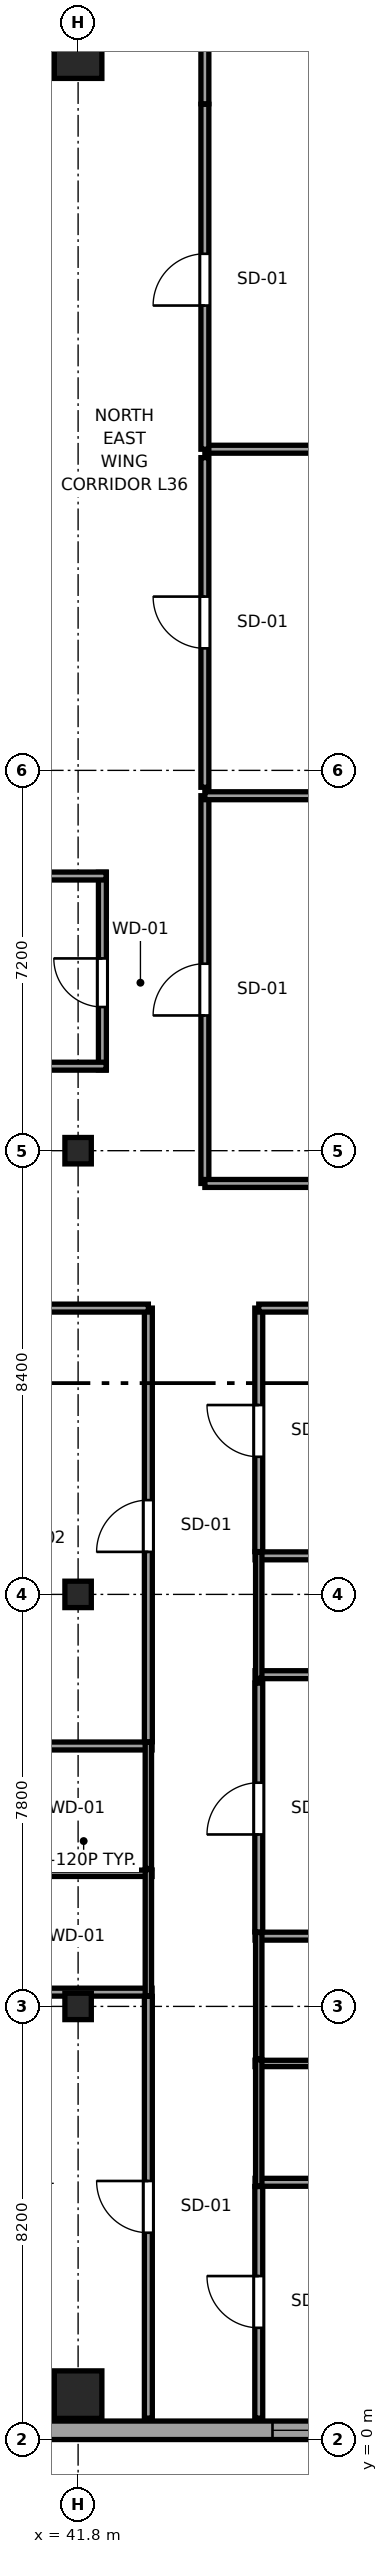
"""IFC4 building model, lengths in metres.
Left out: names, types, materials, properties, quantities, classifications, styles, units other than length and angle.
Written with IfcOpenShell. Run it as: python <this file> out.ifc"""

import sys

from ifc_helpers import new_model, si_unit, direction, frame, frame_2d, origin, origin_2d, place, context, subcontext, project, spatial, rectangle, i_section, extrude, source, transform, mapped, element, fill, save


model = new_model("IFC4")
c1 = context("Model", 3, precision=1e-05, world=origin(), true_north=direction((0.0, 1.0)))
c2 = subcontext(c1, "Body", "Model", "MODEL_VIEW")
j1 = project(units=[si_unit("LENGTHUNIT", "METRE"), si_unit("PLANEANGLEUNIT", "RADIAN")], contexts=[c1])
p1 = place(None, origin())
s1 = spatial("IfcSite", under=j1, at=p1, CompositionType="ELEMENT")
p2 = place(p1, origin())
s2 = spatial("IfcBuilding", under=s1, at=p2, CompositionType="ELEMENT")
p3 = place(p2, frame((0.0, 0.0, 139.95)))
s3 = spatial("IfcBuildingStorey", under=s2, at=p3, CompositionType="ELEMENT", Elevation=139.95)
m1 = source(origin(), c2, "Body", "SweptSolid", [
    extrude(rectangle(XDim=0.9, YDim=0.9, at=origin_2d()), origin(), (0.0, 0.0, 1.0), 3.55),
])
p4 = place(p3, frame((41.8, 0.85, 0.0), z_axis=(0.0, 0.0, 1.0), x_axis=(1.0, 0.0, 0.0)))
e1 = element("IfcColumn", 1, at=p4, inside=s3, PredefinedType="COLUMN", context=c2, shape_type="MappedRepresentation", body=[
    mapped(m1, transform((0.0, 0.0, 0.0), x_axis=(1.0, 0.0, 0.0), y_axis=(0.0, 1.0, 0.0), z_axis=(0.0, 0.0, 1.0), scale=1.0)),
])
m2 = source(origin(), c2, "Body", "SweptSolid", [
    extrude(i_section(OverallWidth=0.5, OverallDepth=0.5, WebThickness=0.022, FlangeThickness=0.034, at=origin_2d()), origin(), (0.0, 0.0, 1.0), 3.55),
])
for number, where, z_axis, x_axis in (
    (2, (41.8, 8.2, 0.0), (0.0, 0.0, 1.0), (1.0, 0.0, 0.0)),
    (3, (41.8, 16.0, 0.0), (0.0, 0.0, 1.0), (1.0, 0.0, 0.0)),
    (4, (41.8, 24.4, 0.0), (0.0, 0.0, 1.0), (1.0, 0.0, 0.0)),
):
    element("IfcColumn", number, at=place(p3, frame(where, z_axis=z_axis, x_axis=x_axis)), inside=s3, PredefinedType="COLUMN", context=c2, shape_type="MappedRepresentation", body=[
        mapped(m2, transform((0.0, 0.0, 0.0), x_axis=(1.0, 0.0, 0.0), y_axis=(0.0, 1.0, 0.0), z_axis=(0.0, 0.0, 1.0), scale=1.0)),
    ])
p5 = place(p3, frame((41.8, 45.15, 0.0), z_axis=(0.0, 0.0, 1.0), x_axis=(1.0, 0.0, 0.0)))
e5 = element("IfcColumn", 5, at=p5, inside=s3, PredefinedType="COLUMN", context=c2, shape_type="MappedRepresentation", body=[
    mapped(m1, transform((0.0, 0.0, 0.0), x_axis=(1.0, 0.0, 0.0), y_axis=(0.0, 1.0, 0.0), z_axis=(0.0, 0.0, 1.0), scale=1.0)),
])
p6 = place(p3, frame((34.375, 0.175, 0.0), z_axis=(0.0, 0.0, 1.0), x_axis=(1.0, 0.0, 0.0)))
e6 = element("IfcWall", 6, at=p6, inside=s3, PredefinedType="SOLIDWALL", context=c2, shape_type="SweptSolid", body=[
    extrude(rectangle(XDim=18.008, YDim=0.35, at=frame_2d((9.004, 0.0))), origin(), (0.0, 0.0, 1.0), 3.37),
])
p7 = place(p6, frame((1.651, 0.0, 0.68)))
e7 = element("IfcOpeningElement", 7, at=p7, cuts=e6, PredefinedType="OPENING", context=c2, shape_type="SweptSolid", body=[
    extrude(rectangle(XDim=2.1, YDim=1.9, at=frame_2d((1.05, 0.95))), frame((0.0, 0.185, 0.0), z_axis=(0.0, -1.0, 0.0), x_axis=(1.0, 0.0, 0.0)), (0.0, 0.0, 1.0), 0.37),
])
p8 = place(p6, frame((11.105, 0.0, 0.68)))
e8 = element("IfcOpeningElement", 8, at=p8, cuts=e6, PredefinedType="OPENING", context=c2, shape_type="SweptSolid", body=[
    extrude(rectangle(XDim=2.1, YDim=1.9, at=frame_2d((1.05, 0.95))), frame((0.0, 0.185, 0.0), z_axis=(0.0, -1.0, 0.0), x_axis=(1.0, 0.0, 0.0)), (0.0, 0.0, 1.0), 0.37),
])
p9 = place(p3, frame((40.61, 8.47, 0.0), z_axis=(0.0, 0.0, 1.0), x_axis=(1.0, 0.0, 0.0)))
e9 = element("IfcWall", 9, at=p9, inside=s3, PredefinedType="PARTITIONING", context=c2, shape_type="SweptSolid", body=[
    extrude(rectangle(XDim=2.59, YDim=0.15, at=frame_2d((1.295, 0.0))), origin(), (0.0, 0.0, 1.0), 3.37),
])
p10 = place(p3, frame((40.61, 10.72, 0.0), z_axis=(0.0, 0.0, 1.0), x_axis=(1.0, 0.0, 0.0)))
e10 = element("IfcWall", 10, at=p10, inside=s3, PredefinedType="PLUMBINGWALL", context=c2, shape_type="SweptSolid", body=[
    extrude(rectangle(XDim=2.59, YDim=0.12, at=frame_2d((1.295, 0.0))), origin(), (0.0, 0.0, 1.0), 3.37),
])
p11 = place(p3, frame((43.13, 8.4, 0.0), z_axis=(0.0, 0.0, 1.0), x_axis=(0.0, 1.0, 0.0)))
e11 = element("IfcWall", 11, at=p11, inside=s3, PredefinedType="PLUMBINGWALL", context=c2, shape_type="SweptSolid", body=[
    extrude(rectangle(XDim=2.39, YDim=0.12, at=frame_2d((1.195, 0.0))), origin(), (0.0, 0.0, 1.0), 3.37),
])
p12 = place(p3, frame((40.61, 13.13, 0.0), z_axis=(0.0, 0.0, 1.0), x_axis=(1.0, 0.0, 0.0)))
e12 = element("IfcWall", 12, at=p12, inside=s3, PredefinedType="PARTITIONING", context=c2, shape_type="SweptSolid", body=[
    extrude(rectangle(XDim=2.59, YDim=0.15, at=frame_2d((1.295, 0.0))), origin(), (0.0, 0.0, 1.0), 3.37),
])
p13 = place(p3, frame((43.13, 10.81, 0.0), z_axis=(0.0, 0.0, 1.0), x_axis=(0.0, 1.0, 0.0)))
e13 = element("IfcWall", 13, at=p13, inside=s3, PredefinedType="PLUMBINGWALL", context=c2, shape_type="SweptSolid", body=[
    extrude(rectangle(XDim=2.39, YDim=0.12, at=frame_2d((1.195, 0.0))), origin(), (0.0, 0.0, 1.0), 3.37),
])
p14 = place(p3, frame((45.15, 4.87, 0.0), z_axis=(0.0, 0.0, 1.0), x_axis=(1.0, 0.0, 0.0)))
e14 = element("IfcWall", 14, at=p14, inside=s3, PredefinedType="PARTITIONING", context=c2, shape_type="SweptSolid", body=[
    extrude(rectangle(XDim=2.59, YDim=0.15, at=frame_2d((1.295, 0.0))), origin(), (0.0, 0.0, 1.0), 3.37),
])
p15 = place(p3, frame((45.15, 7.12, 0.0), z_axis=(0.0, 0.0, 1.0), x_axis=(1.0, 0.0, 0.0)))
e15 = element("IfcWall", 15, at=p15, inside=s3, PredefinedType="PLUMBINGWALL", context=c2, shape_type="SweptSolid", body=[
    extrude(rectangle(XDim=2.59, YDim=0.12, at=frame_2d((1.295, 0.0))), origin(), (0.0, 0.0, 1.0), 3.37),
])
p16 = place(p3, frame((45.22, 4.8, 0.0), z_axis=(0.0, 0.0, 1.0), x_axis=(0.0, 1.0, 0.0)))
e16 = element("IfcWall", 16, at=p16, inside=s3, PredefinedType="PLUMBINGWALL", context=c2, shape_type="SweptSolid", body=[
    extrude(rectangle(XDim=2.39, YDim=0.12, at=frame_2d((1.195, 0.0))), origin(), (0.0, 0.0, 1.0), 3.37),
])
p17 = place(p3, frame((45.15, 9.53, 0.0), z_axis=(0.0, 0.0, 1.0), x_axis=(1.0, 0.0, 0.0)))
e17 = element("IfcWall", 17, at=p17, inside=s3, PredefinedType="PARTITIONING", context=c2, shape_type="SweptSolid", body=[
    extrude(rectangle(XDim=2.59, YDim=0.15, at=frame_2d((1.295, 0.0))), origin(), (0.0, 0.0, 1.0), 3.37),
])
p18 = place(p3, frame((45.22, 7.21, 0.0), z_axis=(0.0, 0.0, 1.0), x_axis=(0.0, 1.0, 0.0)))
e18 = element("IfcWall", 18, at=p18, inside=s3, PredefinedType="PLUMBINGWALL", context=c2, shape_type="SweptSolid", body=[
    extrude(rectangle(XDim=2.39, YDim=0.12, at=frame_2d((1.195, 0.0))), origin(), (0.0, 0.0, 1.0), 3.37),
])
p19 = place(p3, frame((45.15, 14.48, 0.0), z_axis=(0.0, 0.0, 1.0), x_axis=(1.0, 0.0, 0.0)))
e19 = element("IfcWall", 19, at=p19, inside=s3, PredefinedType="PARTITIONING", context=c2, shape_type="SweptSolid", body=[
    extrude(rectangle(XDim=11.445, YDim=0.15, at=frame_2d((5.723, 0.0))), origin(), (0.0, 0.0, 1.0), 3.37),
])
p20 = place(p3, frame((45.15, 16.73, 0.0), z_axis=(0.0, 0.0, 1.0), x_axis=(1.0, 0.0, 0.0)))
e20 = element("IfcWall", 20, at=p20, inside=s3, PredefinedType="PARTITIONING", context=c2, shape_type="SweptSolid", body=[
    extrude(rectangle(XDim=2.59, YDim=0.15, at=frame_2d((1.295, 0.0))), origin(), (0.0, 0.0, 1.0), 3.37),
])
p21 = place(p3, frame((45.22, 14.41, 0.0), z_axis=(0.0, 0.0, 1.0), x_axis=(0.0, 1.0, 0.0)))
e21 = element("IfcWall", 21, at=p21, inside=s3, PredefinedType="PLUMBINGWALL", context=c2, shape_type="SweptSolid", body=[
    extrude(rectangle(XDim=2.39, YDim=0.12, at=frame_2d((1.195, 0.0))), origin(), (0.0, 0.0, 1.0), 3.37),
])
p22 = place(p3, frame((44.2, 37.68, 0.0), z_axis=(0.0, 0.0, 1.0), x_axis=(1.0, 0.0, 0.0)))
e22 = element("IfcWall", 22, at=p22, inside=s3, PredefinedType="PARTITIONING", context=c2, shape_type="SweptSolid", body=[
    extrude(rectangle(XDim=12.395, YDim=0.15, at=frame_2d((6.198, 0.0))), origin(), (0.0, 0.0, 1.0), 3.37),
])
p23 = place(p3, frame((43.13, 0.405, 0.0), z_axis=(0.0, 0.0, 1.0), x_axis=(0.0, 1.0, 0.0)))
e23 = element("IfcWall", 23, at=p23, inside=s3, PredefinedType="PARTITIONING", context=c2, shape_type="SweptSolid", body=[
    extrude(rectangle(XDim=7.985, YDim=0.15, at=frame_2d((3.992, 0.0))), origin(), (0.0, 0.0, 1.0), 3.37),
])
p24 = place(p23, frame((3.51, 0.0, 0.0)))
e24 = element("IfcOpeningElement", 24, at=p24, cuts=e23, PredefinedType="OPENING", context=c2, shape_type="SweptSolid", body=[
    extrude(rectangle(XDim=0.98, YDim=2.12, at=frame_2d((0.49, 1.06))), frame((0.0, 0.085, 0.0), z_axis=(0.0, -1.0, 0.0), x_axis=(1.0, 0.0, 0.0)), (0.0, 0.0, 1.0), 0.17),
])
p25 = place(p3, frame((43.13, 13.21, 0.0), z_axis=(0.0, 0.0, 1.0), x_axis=(0.0, 1.0, 0.0)))
e25 = element("IfcWall", 25, at=p25, inside=s3, PredefinedType="PARTITIONING", context=c2, shape_type="SweptSolid", body=[
    extrude(rectangle(XDim=8.21, YDim=0.15, at=frame_2d((4.105, 0.0))), origin(), (0.0, 0.0, 1.0), 3.37),
])
p26 = place(p25, frame((3.595, 0.0, 0.0)))
e26 = element("IfcOpeningElement", 26, at=p26, cuts=e25, PredefinedType="OPENING", context=c2, shape_type="SweptSolid", body=[
    extrude(rectangle(XDim=0.98, YDim=2.12, at=frame_2d((0.49, 1.06))), frame((0.0, 0.085, 0.0), z_axis=(0.0, -1.0, 0.0), x_axis=(1.0, 0.0, 0.0)), (0.0, 0.0, 1.0), 0.17),
])
p27 = place(p3, frame((34.65, 21.42, 0.0), z_axis=(0.0, 0.0, 1.0), x_axis=(1.0, 0.0, 0.0)))
e27 = element("IfcWall", 27, at=p27, inside=s3, PredefinedType="PARTITIONING", context=c2, shape_type="SweptSolid", body=[
    extrude(rectangle(XDim=8.48, YDim=0.15, at=frame_2d((4.24, 0.0))), origin(), (0.0, 0.0, 1.0), 3.37),
])
p28 = place(p3, frame((45.22, 0.405, 0.0), z_axis=(0.0, 0.0, 1.0), x_axis=(0.0, 1.0, 0.0)))
e28 = element("IfcWall", 28, at=p28, inside=s3, PredefinedType="PARTITIONING", context=c2, shape_type="SweptSolid", body=[
    extrude(rectangle(XDim=4.385, YDim=0.15, at=frame_2d((2.192, 0.0))), origin(), (0.0, 0.0, 1.0), 3.37),
])
p29 = place(p28, frame((1.71, 0.0, 0.0)))
e29 = element("IfcOpeningElement", 29, at=p29, cuts=e28, PredefinedType="OPENING", context=c2, shape_type="SweptSolid", body=[
    extrude(rectangle(XDim=0.98, YDim=2.12, at=frame_2d((0.49, 1.06))), frame((0.0, 0.085, 0.0), z_axis=(0.0, -1.0, 0.0), x_axis=(1.0, 0.0, 0.0)), (0.0, 0.0, 1.0), 0.17),
])
p30 = place(p3, frame((45.22, 9.61, 0.0), z_axis=(0.0, 0.0, 1.0), x_axis=(0.0, 1.0, 0.0)))
e30 = element("IfcWall", 30, at=p30, inside=s3, PredefinedType="PARTITIONING", context=c2, shape_type="SweptSolid", body=[
    extrude(rectangle(XDim=4.71, YDim=0.15, at=frame_2d((2.355, 0.0))), origin(), (0.0, 0.0, 1.0), 3.37),
])
p31 = place(p30, frame((1.845, 0.0, 0.0)))
e31 = element("IfcOpeningElement", 31, at=p31, cuts=e30, PredefinedType="OPENING", context=c2, shape_type="SweptSolid", body=[
    extrude(rectangle(XDim=0.98, YDim=2.12, at=frame_2d((0.49, 1.06))), frame((0.0, 0.085, 0.0), z_axis=(0.0, -1.0, 0.0), x_axis=(1.0, 0.0, 0.0)), (0.0, 0.0, 1.0), 0.17),
])
p32 = place(p3, frame((45.22, 16.81, 0.0), z_axis=(0.0, 0.0, 1.0), x_axis=(0.0, 1.0, 0.0)))
e32 = element("IfcWall", 32, at=p32, inside=s3, PredefinedType="PARTITIONING", context=c2, shape_type="SweptSolid", body=[
    extrude(rectangle(XDim=4.61, YDim=0.15, at=frame_2d((2.305, 0.0))), origin(), (0.0, 0.0, 1.0), 3.37),
])
p33 = place(p32, frame((1.795, 0.0, 0.0)))
e33 = element("IfcOpeningElement", 33, at=p33, cuts=e32, PredefinedType="OPENING", context=c2, shape_type="SweptSolid", body=[
    extrude(rectangle(XDim=0.98, YDim=2.12, at=frame_2d((0.49, 1.06))), frame((0.0, 0.085, 0.0), z_axis=(0.0, -1.0, 0.0), x_axis=(1.0, 0.0, 0.0)), (0.0, 0.0, 1.0), 0.17),
])
p34 = place(p3, frame((45.22, 21.42, 0.0), z_axis=(0.0, 0.0, 1.0), x_axis=(1.0, 0.0, 0.0)))
e34 = element("IfcWall", 34, at=p34, inside=s3, PredefinedType="PARTITIONING", context=c2, shape_type="SweptSolid", body=[
    extrude(rectangle(XDim=11.375, YDim=0.15, at=frame_2d((5.688, 0.0))), origin(), (0.0, 0.0, 1.0), 3.37),
])
p35 = place(p3, frame((44.2, 23.78, 0.0), z_axis=(0.0, 0.0, 1.0), x_axis=(0.0, 1.0, 0.0)))
e35 = element("IfcWall", 35, at=p35, inside=s3, PredefinedType="PARTITIONING", context=c2, shape_type="SweptSolid", body=[
    extrude(rectangle(XDim=7.34, YDim=0.15, at=frame_2d((3.67, 0.0))), origin(), (0.0, 0.0, 1.0), 3.37),
])
p36 = place(p35, frame((3.18, 0.0, 0.0)))
e36 = element("IfcOpeningElement", 36, at=p36, cuts=e35, PredefinedType="OPENING", context=c2, shape_type="SweptSolid", body=[
    extrude(rectangle(XDim=0.98, YDim=2.12, at=frame_2d((0.49, 1.06))), frame((0.0, 0.085, 0.0), z_axis=(0.0, -1.0, 0.0), x_axis=(1.0, 0.0, 0.0)), (0.0, 0.0, 1.0), 0.17),
])
p37 = place(p3, frame((44.2, 23.78, 0.0), z_axis=(0.0, 0.0, 1.0), x_axis=(1.0, 0.0, 0.0)))
e37 = element("IfcWall", 37, at=p37, inside=s3, PredefinedType="PARTITIONING", context=c2, shape_type="SweptSolid", body=[
    extrude(rectangle(XDim=12.395, YDim=0.15, at=frame_2d((6.198, 0.0))), origin(), (0.0, 0.0, 1.0), 3.37),
])
p38 = place(p3, frame((44.2, 31.12, 0.0), z_axis=(0.0, 0.0, 1.0), x_axis=(1.0, 0.0, 0.0)))
e38 = element("IfcWall", 38, at=p38, inside=s3, PredefinedType="PARTITIONING", context=c2, shape_type="SweptSolid", body=[
    extrude(rectangle(XDim=10.03, YDim=0.15, at=frame_2d((5.015, 0.0))), origin(), (0.0, 0.0, 1.0), 3.37),
])
p39 = place(p3, frame((44.2, 31.28, 0.0), z_axis=(0.0, 0.0, 1.0), x_axis=(0.0, 1.0, 0.0)))
e39 = element("IfcWall", 39, at=p39, inside=s3, PredefinedType="PARTITIONING", context=c2, shape_type="SweptSolid", body=[
    extrude(rectangle(XDim=6.24, YDim=0.15, at=frame_2d((3.12, 0.0))), origin(), (0.0, 0.0, 1.0), 3.37),
])
p40 = place(p39, frame((2.63, 0.0, 0.0)))
e40 = element("IfcOpeningElement", 40, at=p40, cuts=e39, PredefinedType="OPENING", context=c2, shape_type="SweptSolid", body=[
    extrude(rectangle(XDim=0.98, YDim=2.12, at=frame_2d((0.49, 1.06))), frame((0.0, 0.085, 0.0), z_axis=(0.0, -1.0, 0.0), x_axis=(1.0, 0.0, 0.0)), (0.0, 0.0, 1.0), 0.17),
])
p41 = place(p3, frame((44.2, 37.68, 0.0), z_axis=(0.0, 0.0, 1.0), x_axis=(0.0, 1.0, 0.0)))
e41 = element("IfcWall", 41, at=p41, inside=s3, PredefinedType="PARTITIONING", context=c2, shape_type="SweptSolid", body=[
    extrude(rectangle(XDim=6.53, YDim=0.15, at=frame_2d((3.265, 0.0))), origin(), (0.0, 0.0, 1.0), 3.37),
])
p42 = place(p41, frame((2.72, 0.0, 0.0)))
e42 = element("IfcOpeningElement", 42, at=p42, cuts=e41, PredefinedType="OPENING", context=c2, shape_type="SweptSolid", body=[
    extrude(rectangle(XDim=0.98, YDim=2.12, at=frame_2d((0.49, 1.06))), frame((0.0, 0.085, 0.0), z_axis=(0.0, -1.0, 0.0), x_axis=(1.0, 0.0, 0.0)), (0.0, 0.0, 1.0), 0.17),
])
p43 = place(p3, frame((44.2, 44.22, 0.0), z_axis=(0.0, 0.0, 1.0), x_axis=(0.0, 1.0, 0.0)))
e43 = element("IfcWall", 43, at=p43, inside=s3, PredefinedType="PARTITIONING", context=c2, shape_type="SweptSolid", body=[
    extrude(rectangle(XDim=1.375, YDim=0.15, at=frame_2d((0.688, 0.0))), origin(), (0.0, 0.0, 1.0), 3.37),
])
p44 = place(p3, frame((42.26, 25.93, 0.0), z_axis=(0.0, 0.0, 1.0), x_axis=(0.0, 1.0, 0.0)))
e44 = element("IfcWall", 44, at=p44, inside=s3, PredefinedType="PARTITIONING", context=c2, shape_type="SweptSolid", body=[
    extrude(rectangle(XDim=3.74, YDim=0.15, at=frame_2d((1.87, 0.0))), origin(), (0.0, 0.0, 1.0), 3.37),
])
p45 = place(p44, frame((1.19, 0.0, 0.0)))
e45 = element("IfcOpeningElement", 45, at=p45, cuts=e44, PredefinedType="OPENING", context=c2, shape_type="SweptSolid", body=[
    extrude(rectangle(XDim=0.92, YDim=2.01, at=frame_2d((0.46, 1.005))), frame((0.0, 0.085, 0.0), z_axis=(0.0, -1.0, 0.0), x_axis=(1.0, 0.0, 0.0)), (0.0, 0.0, 1.0), 0.17),
])
for number, where, z_axis, x_axis in (
    (46, (37.93, 26.0, 0.0), (0.0, 0.0, 1.0), (1.0, 0.0, 0.0)),
    (47, (37.93, 29.6, 0.0), (0.0, 0.0, 1.0), (1.0, 0.0, 0.0)),
):
    element("IfcWall", number, at=place(p3, frame(where, z_axis=z_axis, x_axis=x_axis)), inside=s3, PredefinedType="PARTITIONING", context=c2, shape_type="SweptSolid", body=[
        extrude(rectangle(XDim=4.4, YDim=0.15, at=frame_2d((2.2, 0.0))), origin(), (0.0, 0.0, 1.0), 3.37),
    ])
m3 = source(origin(), c2, "Body", "SweptSolid", [
    extrude(rectangle(XDim=2.1, YDim=1.9, at=frame_2d((1.05, 0.95))), frame((0.0, 0.09, 0.0), z_axis=(0.0, -1.0, 0.0), x_axis=(1.0, 0.0, 0.0)), (0.0, 0.0, 1.0), 0.06),
])
p46 = place(p8, origin())
e48 = element("IfcWindow", 48, at=p46, inside=s3, PartitioningType="TRIPLE_PANEL_HORIZONTAL", PredefinedType="WINDOW", context=c2, shape_type="MappedRepresentation", body=[
    mapped(m3, transform((0.0, 0.0, 0.0), x_axis=(1.0, 0.0, 0.0), y_axis=(0.0, 1.0, 0.0), z_axis=(0.0, 0.0, 1.0), scale=1.0)),
])
fill(e8, e48)
m4 = source(origin(), c2, "Body", "SweptSolid", [
    extrude(rectangle(XDim=0.98, YDim=2.12, at=frame_2d((0.49, 1.06))), frame((0.0, 0.025, 0.0), z_axis=(0.0, -1.0, 0.0), x_axis=(1.0, 0.0, 0.0)), (0.0, 0.0, 1.0), 0.05),
])
p47 = place(p24, origin())
e49 = element("IfcDoor", 49, at=p47, inside=s3, OperationType="SINGLE_SWING_RIGHT", PredefinedType="DOOR", context=c2, shape_type="MappedRepresentation", body=[
    mapped(m4, transform((0.0, 0.0, 0.0), x_axis=(1.0, 0.0, 0.0), y_axis=(0.0, 1.0, 0.0), z_axis=(0.0, 0.0, 1.0), scale=1.0)),
])
fill(e24, e49)
p48 = place(p26, origin())
e50 = element("IfcDoor", 50, at=p48, inside=s3, OperationType="SINGLE_SWING_LEFT", PredefinedType="DOOR", context=c2, shape_type="MappedRepresentation", body=[
    mapped(m4, transform((0.0, 0.0, 0.0), x_axis=(1.0, 0.0, 0.0), y_axis=(0.0, 1.0, 0.0), z_axis=(0.0, 0.0, 1.0), scale=1.0)),
])
fill(e26, e50)
p49 = place(p29, origin())
e51 = element("IfcDoor", 51, at=p49, inside=s3, OperationType="SINGLE_SWING_RIGHT", PredefinedType="DOOR", context=c2, shape_type="MappedRepresentation", body=[
    mapped(m4, transform((0.0, 0.0, 0.0), x_axis=(1.0, 0.0, 0.0), y_axis=(0.0, 1.0, 0.0), z_axis=(0.0, 0.0, 1.0), scale=1.0)),
])
fill(e29, e51)
p50 = place(p31, origin())
e52 = element("IfcDoor", 52, at=p50, inside=s3, OperationType="SINGLE_SWING_LEFT", PredefinedType="DOOR", context=c2, shape_type="MappedRepresentation", body=[
    mapped(m4, transform((0.0, 0.0, 0.0), x_axis=(1.0, 0.0, 0.0), y_axis=(0.0, 1.0, 0.0), z_axis=(0.0, 0.0, 1.0), scale=1.0)),
])
fill(e31, e52)
p51 = place(p33, origin())
e53 = element("IfcDoor", 53, at=p51, inside=s3, OperationType="SINGLE_SWING_RIGHT", PredefinedType="DOOR", context=c2, shape_type="MappedRepresentation", body=[
    mapped(m4, transform((0.0, 0.0, 0.0), x_axis=(1.0, 0.0, 0.0), y_axis=(0.0, 1.0, 0.0), z_axis=(0.0, 0.0, 1.0), scale=1.0)),
])
fill(e33, e53)
p52 = place(p36, origin())
e54 = element("IfcDoor", 54, at=p52, inside=s3, OperationType="SINGLE_SWING_LEFT", PredefinedType="DOOR", context=c2, shape_type="MappedRepresentation", body=[
    mapped(m4, transform((0.0, 0.0, 0.0), x_axis=(1.0, 0.0, 0.0), y_axis=(0.0, 1.0, 0.0), z_axis=(0.0, 0.0, 1.0), scale=1.0)),
])
fill(e36, e54)
p53 = place(p40, origin())
e55 = element("IfcDoor", 55, at=p53, inside=s3, OperationType="SINGLE_SWING_RIGHT", PredefinedType="DOOR", context=c2, shape_type="MappedRepresentation", body=[
    mapped(m4, transform((0.0, 0.0, 0.0), x_axis=(1.0, 0.0, 0.0), y_axis=(0.0, 1.0, 0.0), z_axis=(0.0, 0.0, 1.0), scale=1.0)),
])
fill(e40, e55)
p54 = place(p42, origin())
e56 = element("IfcDoor", 56, at=p54, inside=s3, OperationType="SINGLE_SWING_LEFT", PredefinedType="DOOR", context=c2, shape_type="MappedRepresentation", body=[
    mapped(m4, transform((0.0, 0.0, 0.0), x_axis=(1.0, 0.0, 0.0), y_axis=(0.0, 1.0, 0.0), z_axis=(0.0, 0.0, 1.0), scale=1.0)),
])
fill(e42, e56)
m5 = source(origin(), c2, "Body", "SweptSolid", [
    extrude(rectangle(XDim=0.92, YDim=2.01, at=frame_2d((0.46, 1.005))), frame((0.0, 0.025, 0.0), z_axis=(0.0, -1.0, 0.0), x_axis=(1.0, 0.0, 0.0)), (0.0, 0.0, 1.0), 0.05),
])
p55 = place(p45, origin())
e57 = element("IfcDoor", 57, at=p55, inside=s3, OperationType="SINGLE_SWING_RIGHT", PredefinedType="DOOR", context=c2, shape_type="MappedRepresentation", body=[
    mapped(m5, transform((0.0, 0.0, 0.0), x_axis=(1.0, 0.0, 0.0), y_axis=(0.0, 1.0, 0.0), z_axis=(0.0, 0.0, 1.0), scale=1.0)),
])
fill(e45, e57)
save(model, sys.argv[1])
